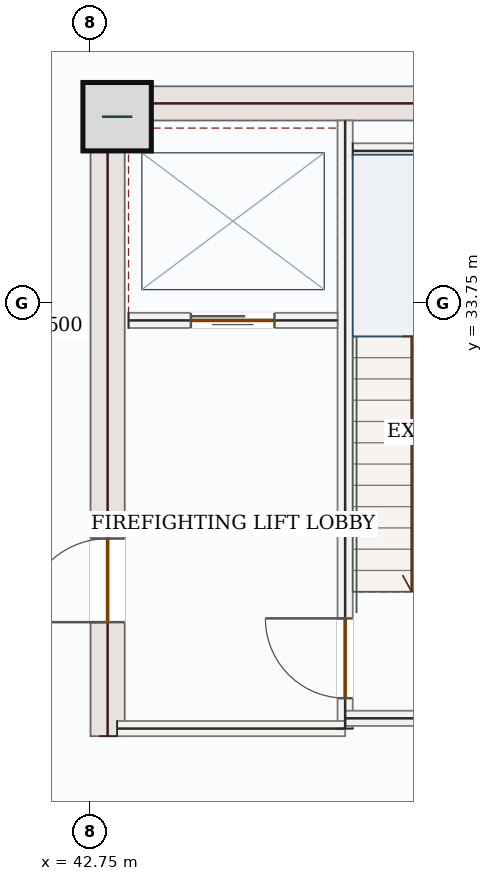
"""IFC4 building model, lengths in metres.
Left out: names, types, materials, properties, quantities, classifications, styles, units other than length and angle.
Written with IfcOpenShell. Run it as: python <this file> out.ifc"""

import sys

from ifc_helpers import new_model, si_unit, direction, frame, frame_2d, origin, origin_2d, place, context, subcontext, project, spatial, rectangle, extrude, source, transform, mapped, element, fill, save


model = new_model("IFC4")
c1 = context("Model", 3, precision=1e-05, world=origin(), true_north=direction((0.0, 1.0)))
c2 = subcontext(c1, "Body", "Model", "MODEL_VIEW")
j1 = project(units=[si_unit("LENGTHUNIT", "METRE"), si_unit("PLANEANGLEUNIT", "RADIAN")], contexts=[c1])
p1 = place(None, origin())
s1 = spatial("IfcSite", under=j1, at=p1, CompositionType="ELEMENT")
p2 = place(p1, origin())
s2 = spatial("IfcBuilding", under=s1, at=p2, CompositionType="ELEMENT")
p3 = place(p2, frame((0.0, 0.0, 361.05)))
s3 = spatial("IfcBuildingStorey", under=s2, at=p3, CompositionType="ELEMENT", Elevation=361.05)
p4 = place(p3, frame((42.975, 28.05, 0.0), z_axis=(0.0, 0.0, 1.0), x_axis=(0.0, 1.0, 0.0)))
e1 = element("IfcWall", 1, at=p4, inside=s3, PredefinedType="SHEAR", context=c2, shape_type="SweptSolid", body=[
    extrude(rectangle(XDim=8.55, YDim=0.45, at=frame_2d((4.275, 0.0))), origin(), (0.0, 0.0, 1.0), 4.5),
])
p5 = place(p4, frame((1.5, 0.0, 0.0)))
e2 = element("IfcOpeningElement", 2, at=p5, cuts=e1, PredefinedType="OPENING", context=c2, shape_type="SweptSolid", body=[
    extrude(rectangle(XDim=1.1, YDim=2.2, at=frame_2d((0.55, 1.1))), frame((0.0, 0.235, 0.0), z_axis=(0.0, -1.0, 0.0), x_axis=(1.0, 0.0, 0.0)), (0.0, 0.0, 1.0), 0.47),
])
m1 = source(origin(), c2, "Body", "SweptSolid", [
    extrude(rectangle(XDim=7.1, YDim=0.45, at=frame_2d((3.55, 0.0))), origin(), (0.0, 0.0, 1.0), 4.5),
])
p6 = place(p3, frame((43.2, 36.375, 0.0), z_axis=(0.0, 0.0, 1.0), x_axis=(1.0, 0.0, 0.0)))
e3 = element("IfcWall", 3, at=p6, inside=s3, PredefinedType="SHEAR", context=c2, shape_type="MappedRepresentation", body=[
    mapped(m1, transform((0.0, 0.0, 0.0), x_axis=(1.0, 0.0, 0.0), y_axis=(0.0, 1.0, 0.0), z_axis=(0.0, 0.0, 1.0), scale=1.0)),
])
m2 = source(origin(), c2, "Body", "SweptSolid", [
    extrude(rectangle(XDim=0.9, YDim=0.9, at=origin_2d()), origin(), (0.0, 0.0, 1.0), 4.8),
])
p7 = place(p3, frame((43.1, 36.2, 0.0), z_axis=(0.0, 0.0, 1.0), x_axis=(1.0, 0.0, 0.0)))
e4 = element("IfcColumn", 4, at=p7, inside=s3, PredefinedType="COLUMN", context=c2, shape_type="MappedRepresentation", body=[
    mapped(m2, transform((0.0, 0.0, 0.0), x_axis=(1.0, 0.0, 0.0), y_axis=(0.0, 1.0, 0.0), z_axis=(0.0, 0.0, 1.0), scale=1.0)),
])
p8 = place(p3, frame((46.1, 28.15, 0.0), z_axis=(0.0, 0.0, 1.0), x_axis=(0.0, 1.0, 0.0)))
e5 = element("IfcWall", 5, at=p8, inside=s3, PredefinedType="SOLIDWALL", context=c2, shape_type="SweptSolid", body=[
    extrude(rectangle(XDim=8.0, YDim=0.2, at=frame_2d((4.0, 0.0))), origin(), (0.0, 0.0, 1.0), 4.5),
])
p9 = place(p8, frame((0.4, 0.0, 0.0)))
e6 = element("IfcOpeningElement", 6, at=p9, cuts=e5, PredefinedType="OPENING", context=c2, shape_type="SweptSolid", body=[
    extrude(rectangle(XDim=1.05, YDim=2.15, at=frame_2d((0.525, 1.075))), frame((0.0, 0.11, 0.0), z_axis=(0.0, -1.0, 0.0), x_axis=(1.0, 0.0, 0.0)), (0.0, 0.0, 1.0), 0.22),
])
m3 = source(origin(), c2, "Body", "SweptSolid", [
    extrude(rectangle(XDim=3.0, YDim=0.2, at=frame_2d((1.5, 0.0))), origin(), (0.0, 0.0, 1.0), 4.5),
])
p10 = place(p3, frame((43.1, 28.15, 0.0), z_axis=(0.0, 0.0, 1.0), x_axis=(1.0, 0.0, 0.0)))
e7 = element("IfcWall", 7, at=p10, inside=s3, PredefinedType="SOLIDWALL", context=c2, shape_type="MappedRepresentation", body=[
    mapped(m3, transform((0.0, 0.0, 0.0), x_axis=(1.0, 0.0, 0.0), y_axis=(0.0, 1.0, 0.0), z_axis=(0.0, 0.0, 1.0), scale=1.0)),
])
m4 = source(origin(), c2, "Body", "SweptSolid", [
    extrude(rectangle(XDim=4.25, YDim=0.2, at=frame_2d((2.125, 0.0))), origin(), (0.0, 0.0, 1.0), 4.5),
])
p11 = place(p3, frame((46.1, 28.285, 0.0), z_axis=(0.0, 0.0, 1.0), x_axis=(1.0, 0.0, 0.0)))
e8 = element("IfcWall", 8, at=p11, inside=s3, PredefinedType="SOLIDWALL", context=c2, shape_type="MappedRepresentation", body=[
    mapped(m4, transform((0.0, 0.0, 0.0), x_axis=(1.0, 0.0, 0.0), y_axis=(0.0, 1.0, 0.0), z_axis=(0.0, 0.0, 1.0), scale=1.0)),
])
m5 = source(origin(), c2, "Body", "SweptSolid", [
    extrude(rectangle(XDim=3.25, YDim=0.2, at=frame_2d((1.625, 0.0))), origin(), (0.0, 0.0, 1.0), 4.5),
])
p12 = place(p3, frame((46.2, 35.75, 0.0), z_axis=(0.0, 0.0, 1.0), x_axis=(1.0, 0.0, 0.0)))
e9 = element("IfcWall", 9, at=p12, inside=s3, PredefinedType="SOLIDWALL", context=c2, shape_type="MappedRepresentation", body=[
    mapped(m5, transform((0.0, 0.0, 0.0), x_axis=(1.0, 0.0, 0.0), y_axis=(0.0, 1.0, 0.0), z_axis=(0.0, 0.0, 1.0), scale=1.0)),
])
p13 = place(p3, frame((43.25, 33.52, 0.0), z_axis=(0.0, 0.0, 1.0), x_axis=(1.0, 0.0, 0.0)))
e10 = element("IfcWall", 10, at=p13, inside=s3, PredefinedType="SOLIDWALL", context=c2, shape_type="SweptSolid", body=[
    extrude(rectangle(XDim=2.75, YDim=0.2, at=frame_2d((1.375, 0.0))), origin(), (0.0, 0.0, 1.0), 4.5),
])
p14 = place(p13, frame((0.82, 0.0, 0.0)))
e11 = element("IfcOpeningElement", 11, at=p14, cuts=e10, PredefinedType="OPENING", context=c2, shape_type="SweptSolid", body=[
    extrude(rectangle(XDim=1.1, YDim=2.15, at=frame_2d((0.55, 1.075))), frame((0.0, 0.11, 0.0), z_axis=(0.0, -1.0, 0.0), x_axis=(1.0, 0.0, 0.0)), (0.0, 0.0, 1.0), 0.22),
])
m6 = source(origin(), c2, "Body", "SweptSolid", [
    extrude(rectangle(XDim=1.05, YDim=2.15, at=frame_2d((0.525, 1.075))), frame((0.0, 0.025, 0.0), z_axis=(0.0, -1.0, 0.0), x_axis=(1.0, 0.0, 0.0)), (0.0, 0.0, 1.0), 0.05),
])
p15 = place(p9, origin())
e12 = element("IfcDoor", 12, at=p15, inside=s3, OperationType="SINGLE_SWING_RIGHT", PredefinedType="DOOR", context=c2, shape_type="MappedRepresentation", body=[
    mapped(m6, transform((0.0, 0.0, 0.0), x_axis=(1.0, 0.0, 0.0), y_axis=(0.0, 1.0, 0.0), z_axis=(0.0, 0.0, 1.0), scale=1.0)),
])
fill(e6, e12)
m7 = source(origin(), c2, "Body", "SweptSolid", [
    extrude(rectangle(XDim=1.1, YDim=2.15, at=frame_2d((0.55, 1.075))), frame((0.0, 0.025, 0.0), z_axis=(0.0, -1.0, 0.0), x_axis=(1.0, 0.0, 0.0)), (0.0, 0.0, 1.0), 0.05),
])
p16 = place(p14, origin())
e13 = element("IfcDoor", 13, at=p16, inside=s3, OperationType="DOUBLE_DOOR_SLIDING", PredefinedType="DOOR", context=c2, shape_type="MappedRepresentation", body=[
    mapped(m7, transform((0.0, 0.0, 0.0), x_axis=(1.0, 0.0, 0.0), y_axis=(0.0, 1.0, 0.0), z_axis=(0.0, 0.0, 1.0), scale=1.0)),
])
fill(e11, e13)
m8 = source(origin(), c2, "Body", "SweptSolid", [
    extrude(rectangle(XDim=1.1, YDim=2.2, at=frame_2d((0.55, 1.1))), frame((0.0, 0.025, 0.0), z_axis=(0.0, -1.0, 0.0), x_axis=(1.0, 0.0, 0.0)), (0.0, 0.0, 1.0), 0.05),
])
p17 = place(p5, origin())
e14 = element("IfcDoor", 14, at=p17, inside=s3, OperationType="SINGLE_SWING_LEFT", PredefinedType="DOOR", context=c2, shape_type="MappedRepresentation", body=[
    mapped(m8, transform((0.0, 0.0, 0.0), x_axis=(1.0, 0.0, 0.0), y_axis=(0.0, 1.0, 0.0), z_axis=(0.0, 0.0, 1.0), scale=1.0)),
])
fill(e2, e14)
save(model, sys.argv[1])
